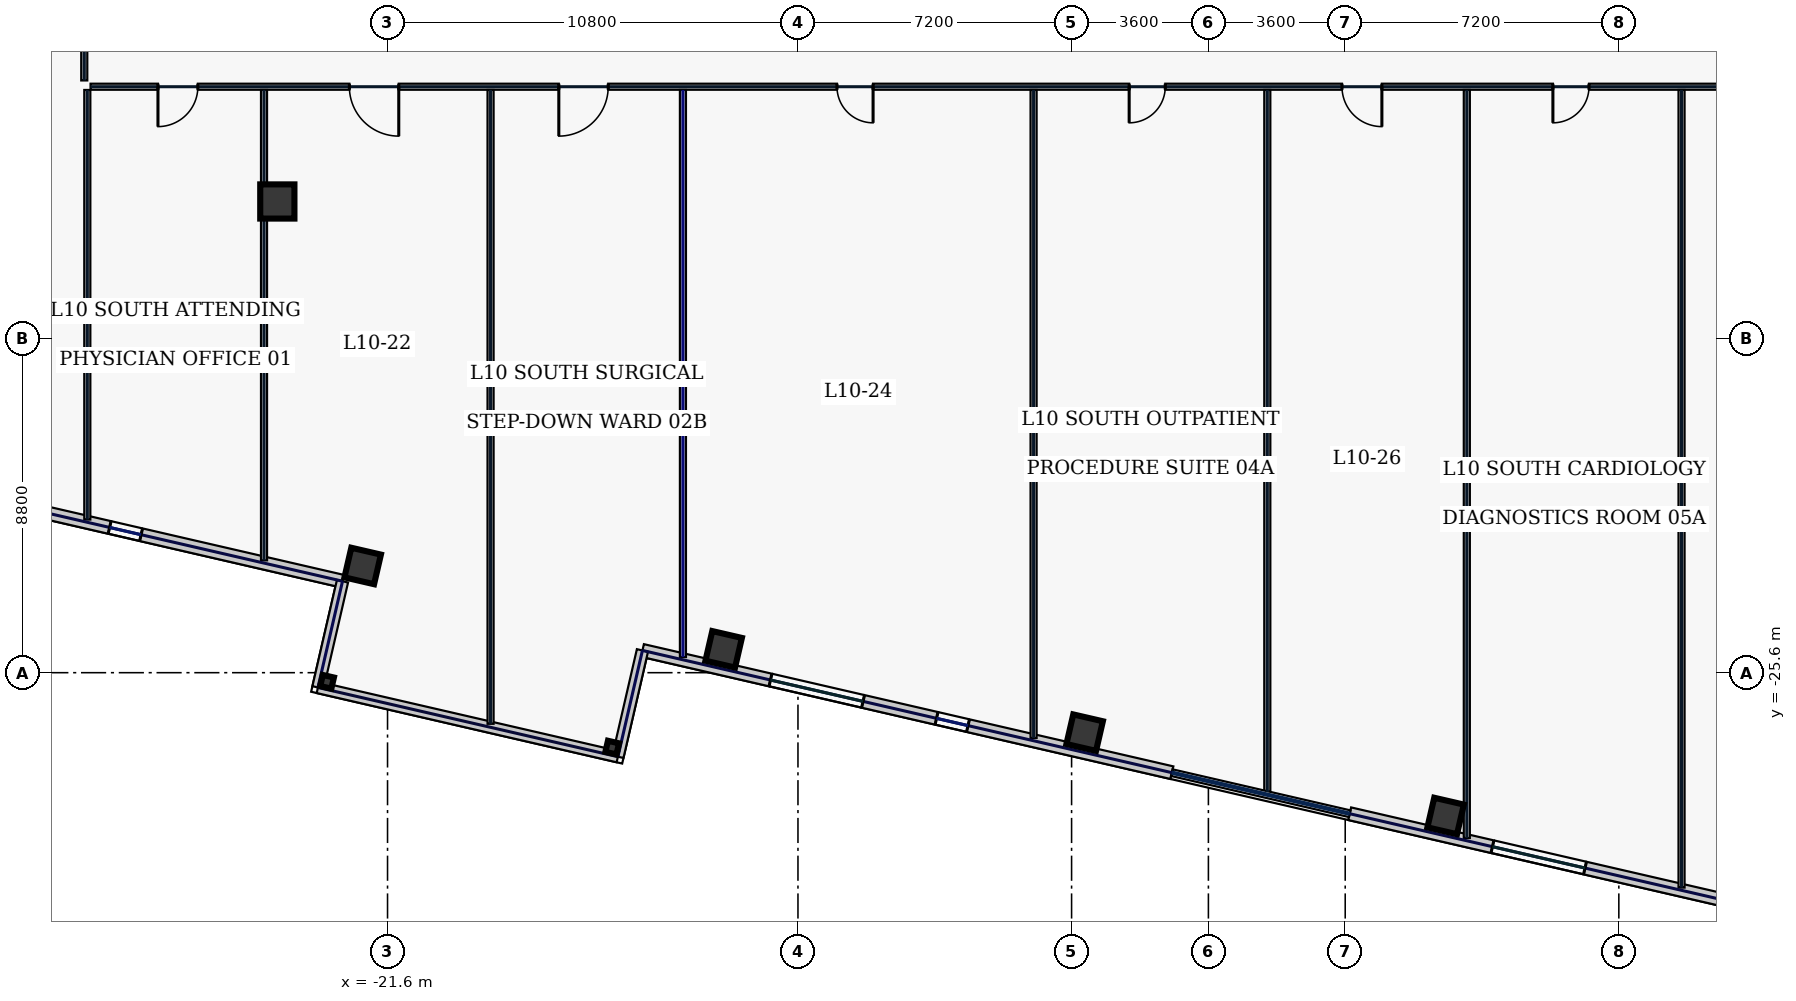
"""IFC4 building model, lengths in metres.
Left out: names, types, materials, properties, quantities, classifications, styles, units other than length and angle.
Written with IfcOpenShell. Run it as: python <this file> out.ifc"""

import sys

from ifc_helpers import new_model, si_unit, direction, frame, frame_2d, origin, origin_2d, place, context, subcontext, project, spatial, rectangle, hollow_rectangle, extrude, element, fill, save


model = new_model("IFC4")
c1 = context("Model", 3, precision=1e-05, world=origin(), true_north=direction((0.0, 1.0)))
c2 = subcontext(c1, "Body", "Model", "MODEL_VIEW")
j1 = project(units=[si_unit("LENGTHUNIT", "METRE"), si_unit("PLANEANGLEUNIT", "RADIAN")], contexts=[c1])
p1 = place(None, origin())
s1 = spatial("IfcSite", under=j1, at=p1, CompositionType="ELEMENT")
p2 = place(p1, origin())
s2 = spatial("IfcBuilding", under=s1, at=p2, CompositionType="ELEMENT")
p3 = place(p2, frame((0.0, 0.0, 51.4)))
s3 = spatial("IfcBuildingStorey", under=s2, at=p3, CompositionType="ELEMENT", Elevation=51.4)
p4 = place(p3, frame((-24.5, -13.2, 0.0), z_axis=(0.0, 0.0, 1.0), x_axis=(1.0, 0.0, 0.0)))
e1 = element("IfcColumn", 1, at=p4, inside=s3, PredefinedType="COLUMN", context=c2, shape_type="SweptSolid", body=[
    extrude(hollow_rectangle(XDim=0.9, YDim=0.9, WallThickness=0.04, at=origin_2d()), origin(), (0.0, 0.0, 1.0), 3.74),
])
for number, where, z_axis, x_axis in (
    (2, (-22.254, -22.792, 0.0), (0.0, 0.0, 1.0), (0.974, -0.225, 0.0)),
    (3, (-12.755, -24.985, 0.0), (0.0, 0.0, 1.0), (0.974, -0.225, 0.0)),
    (4, (-3.256, -27.178, 0.0), (0.0, 0.0, 1.0), (0.974, -0.225, 0.0)),
    (5, (6.242, -29.371, 0.0), (0.0, 0.0, 1.0), (0.974, -0.225, 0.0)),
):
    element("IfcColumn", number, at=place(p3, frame(where, z_axis=z_axis, x_axis=x_axis)), inside=s3, PredefinedType="COLUMN", context=c2, shape_type="SweptSolid", body=[
        extrude(hollow_rectangle(XDim=0.8, YDim=0.8, WallThickness=0.036, at=origin_2d()), origin(), (0.0, 0.0, 1.0), 3.74),
    ])
for number, where, z_axis, x_axis in (
    (6, (-23.19, -25.839, 0.0), (0.0, 0.0, 1.0), (0.974, -0.225, 0.0)),
    (7, (-15.688, -27.571, 0.0), (0.0, 0.0, 1.0), (0.974, -0.225, 0.0)),
):
    element("IfcColumn", number, at=place(p3, frame(where, z_axis=z_axis, x_axis=x_axis)), inside=s3, PredefinedType="COLUMN", context=c2, shape_type="SweptSolid", body=[
        extrude(hollow_rectangle(XDim=0.3, YDim=0.3, WallThickness=0.016, at=origin_2d()), origin(), (0.0, 0.0, 1.0), 3.74),
    ])
p5 = place(p3, frame((-42.029, -18.75, 0.0), z_axis=(0.0, 0.0, 1.0), x_axis=(0.974371399361, -0.224945273581, 0.0)))
e8 = element("IfcWall", 8, at=p5, inside=s3, PredefinedType="STANDARD", context=c2, shape_type="SweptSolid", body=[
    extrude(rectangle(XDim=19.75, YDim=0.34, at=frame_2d((9.875, 0.0))), origin(), (0.0, 0.0, 1.0), 3.74),
])
p6 = place(p5, frame((2.062, 0.0, 0.72)))
e9 = element("IfcOpeningElement", 9, at=p6, cuts=e8, PredefinedType="OPENING", context=c2, shape_type="SweptSolid", body=[
    extrude(rectangle(XDim=2.5, YDim=2.15, at=frame_2d((1.25, 1.075))), frame((0.0, 0.18, 0.0), z_axis=(0.0, -1.0, 0.0), x_axis=(1.0, 0.0, 0.0)), (0.0, 0.0, 1.0), 0.36),
])
p7 = place(p5, frame((6.546, 0.0, 0.72)))
e10 = element("IfcOpeningElement", 10, at=p7, cuts=e8, PredefinedType="OPENING", context=c2, shape_type="SweptSolid", body=[
    extrude(rectangle(XDim=2.5, YDim=2.15, at=frame_2d((1.25, 1.075))), frame((0.0, 0.18, 0.0), z_axis=(0.0, -1.0, 0.0), x_axis=(1.0, 0.0, 0.0)), (0.0, 0.0, 1.0), 0.36),
])
p8 = place(p5, frame((13.461, 0.0, 0.72)))
e11 = element("IfcOpeningElement", 11, at=p8, cuts=e8, PredefinedType="OPENING", context=c2, shape_type="SweptSolid", body=[
    extrude(rectangle(XDim=0.85, YDim=1.85, at=frame_2d((0.425, 0.925))), frame((0.0, 0.18, 0.0), z_axis=(0.0, -1.0, 0.0), x_axis=(1.0, 0.0, 0.0)), (0.0, 0.0, 1.0), 0.36),
])
p9 = place(p3, frame((-14.892, -25.015, 0.0), z_axis=(0.0, 0.0, 1.0), x_axis=(0.974372775, -0.224939314791, 0.0)))
e12 = element("IfcWall", 12, at=p9, inside=s3, PredefinedType="STANDARD", context=c2, shape_type="SweptSolid", body=[
    extrude(rectangle(XDim=14.299, YDim=0.34, at=frame_2d((7.149, 0.0))), origin(), (0.0, 0.0, 1.0), 3.74),
])
p10 = place(p9, frame((3.458, 0.0, 0.72)))
e13 = element("IfcOpeningElement", 13, at=p10, cuts=e12, PredefinedType="OPENING", context=c2, shape_type="SweptSolid", body=[
    extrude(rectangle(XDim=2.5, YDim=2.15, at=frame_2d((1.25, 1.075))), frame((0.0, 0.18, 0.0), z_axis=(0.0, -1.0, 0.0), x_axis=(1.0, 0.0, 0.0)), (0.0, 0.0, 1.0), 0.36),
])
p11 = place(p9, frame((7.942, 0.0, 0.72)))
e14 = element("IfcOpeningElement", 14, at=p11, cuts=e12, PredefinedType="OPENING", context=c2, shape_type="SweptSolid", body=[
    extrude(rectangle(XDim=0.85, YDim=1.85, at=frame_2d((0.425, 0.925))), frame((0.0, 0.18, 0.0), z_axis=(0.0, -1.0, 0.0), x_axis=(1.0, 0.0, 0.0)), (0.0, 0.0, 1.0), 0.36),
])
p12 = place(p3, frame((3.717, -29.311, 0.0), z_axis=(0.0, 0.0, 1.0), x_axis=(0.97436993772, -0.224951604723, 0.0)))
e15 = element("IfcWall", 15, at=p12, inside=s3, PredefinedType="STANDARD", context=c2, shape_type="SweptSolid", body=[
    extrude(rectangle(XDim=22.651, YDim=0.34, at=frame_2d((11.326, 0.0))), origin(), (0.0, 0.0, 1.0), 3.74),
])
p13 = place(p12, frame((3.856, 0.0, 0.72)))
e16 = element("IfcOpeningElement", 16, at=p13, cuts=e15, PredefinedType="OPENING", context=c2, shape_type="SweptSolid", body=[
    extrude(rectangle(XDim=2.5, YDim=2.15, at=frame_2d((1.25, 1.075))), frame((0.0, 0.18, 0.0), z_axis=(0.0, -1.0, 0.0), x_axis=(1.0, 0.0, 0.0)), (0.0, 0.0, 1.0), 0.36),
])
p14 = place(p12, frame((9.991, 0.0, 0.72)))
e17 = element("IfcOpeningElement", 17, at=p14, cuts=e15, PredefinedType="OPENING", context=c2, shape_type="SweptSolid", body=[
    extrude(rectangle(XDim=0.85, YDim=1.85, at=frame_2d((0.425, 0.925))), frame((0.0, 0.18, 0.0), z_axis=(0.0, -1.0, 0.0), x_axis=(1.0, 0.0, 0.0)), (0.0, 0.0, 1.0), 0.36),
])
p15 = place(p12, frame((15.255, 0.0, 0.72)))
e18 = element("IfcOpeningElement", 18, at=p15, cuts=e15, PredefinedType="OPENING", context=c2, shape_type="SweptSolid", body=[
    extrude(rectangle(XDim=0.85, YDim=1.85, at=frame_2d((0.425, 0.925))), frame((0.0, 0.18, 0.0), z_axis=(0.0, -1.0, 0.0), x_axis=(1.0, 0.0, 0.0)), (0.0, 0.0, 1.0), 0.36),
])
p16 = place(p12, frame((19.739, 0.0, 0.72)))
e19 = element("IfcOpeningElement", 19, at=p16, cuts=e15, PredefinedType="OPENING", context=c2, shape_type="SweptSolid", body=[
    extrude(rectangle(XDim=0.85, YDim=1.85, at=frame_2d((0.425, 0.925))), frame((0.0, 0.18, 0.0), z_axis=(0.0, -1.0, 0.0), x_axis=(1.0, 0.0, 0.0)), (0.0, 0.0, 1.0), 0.36),
])
p17 = place(p3, frame((-22.785, -23.193, 0.0), z_axis=(0.0, 0.0, 1.0), x_axis=(-0.224983749842, -0.974362515857, 0.0)))
e20 = element("IfcWall", 20, at=p17, inside=s3, PredefinedType="STANDARD", context=c2, shape_type="SweptSolid", body=[
    extrude(rectangle(XDim=2.87, YDim=0.3, at=frame_2d((1.435, 0.0))), origin(), (0.0, 0.0, 1.0), 3.285),
])
p18 = place(p3, frame((-14.892, -25.015, 0.0), z_axis=(0.0, 0.0, 1.0), x_axis=(-0.225002397841, -0.97435820978, 0.0)))
e21 = element("IfcWall", 21, at=p18, inside=s3, PredefinedType="STANDARD", context=c2, shape_type="SweptSolid", body=[
    extrude(rectangle(XDim=2.87, YDim=0.3, at=frame_2d((1.435, 0.0))), origin(), (0.0, 0.0, 1.0), 3.285),
])
p19 = place(p3, frame((-23.43, -25.989, 0.0), z_axis=(0.0, 0.0, 1.0), x_axis=(0.974371888243, -0.224943155936, 0.0)))
e22 = element("IfcWall", 22, at=p19, inside=s3, PredefinedType="STANDARD", context=c2, shape_type="SweptSolid", body=[
    extrude(rectangle(XDim=8.1, YDim=0.3, at=frame_2d((4.05, 0.0))), origin(), (0.0, 0.0, 1.0), 3.385),
])
p20 = place(p3, frame((-29.58, -10.015, 0.0), z_axis=(0.0, 0.0, 1.0), x_axis=(0.0, 1.0, 0.0)))
e23 = element("IfcWall", 23, at=p20, inside=s3, PredefinedType="PARTITIONING", context=c2, shape_type="SweptSolid", body=[
    extrude(rectangle(XDim=20.13, YDim=0.16, at=frame_2d((10.065, 0.0))), origin(), (0.0, 0.0, 1.0), 3.74),
])
p21 = place(p20, frame((2.169, 0.0, 0.0)))
e24 = element("IfcOpeningElement", 24, at=p21, cuts=e23, PredefinedType="OPENING", context=c2, shape_type="SweptSolid", body=[
    extrude(rectangle(XDim=0.95, YDim=2.2, at=frame_2d((0.475, 1.1))), frame((0.0, 0.09, 0.0), z_axis=(0.0, -1.0, 0.0), x_axis=(1.0, 0.0, 0.0)), (0.0, 0.0, 1.0), 0.18),
])
p22 = place(p20, frame((6.4, 0.0, 0.0)))
e25 = element("IfcOpeningElement", 25, at=p22, cuts=e23, PredefinedType="OPENING", context=c2, shape_type="SweptSolid", body=[
    extrude(rectangle(XDim=0.95, YDim=2.2, at=frame_2d((0.475, 1.1))), frame((0.0, 0.09, 0.0), z_axis=(0.0, -1.0, 0.0), x_axis=(1.0, 0.0, 0.0)), (0.0, 0.0, 1.0), 0.18),
])
p23 = place(p20, frame((11.6, 0.0, 0.0)))
e26 = element("IfcOpeningElement", 26, at=p23, cuts=e23, PredefinedType="OPENING", context=c2, shape_type="SweptSolid", body=[
    extrude(rectangle(XDim=0.95, YDim=2.2, at=frame_2d((0.475, 1.1))), frame((0.0, 0.09, 0.0), z_axis=(0.0, -1.0, 0.0), x_axis=(1.0, 0.0, 0.0)), (0.0, 0.0, 1.0), 0.18),
])
p24 = place(p20, frame((17.131, 0.0, 0.0)))
e27 = element("IfcOpeningElement", 27, at=p24, cuts=e23, PredefinedType="OPENING", context=c2, shape_type="SweptSolid", body=[
    extrude(rectangle(XDim=0.95, YDim=2.2, at=frame_2d((0.475, 1.1))), frame((0.0, 0.09, 0.0), z_axis=(0.0, -1.0, 0.0), x_axis=(1.0, 0.0, 0.0)), (0.0, 0.0, 1.0), 0.18),
])
p25 = place(p3, frame((29.415, -10.18, 0.0), z_axis=(0.0, 0.0, 1.0), x_axis=(-1.0, 0.0, 0.0)))
e28 = element("IfcWall", 28, at=p25, inside=s3, PredefinedType="PARTITIONING", context=c2, shape_type="SweptSolid", body=[
    extrude(rectangle(XDim=58.83, YDim=0.16, at=frame_2d((29.415, 0.0))), origin(), (0.0, 0.0, 1.0), 3.74),
])
p26 = place(p25, frame((56.006, 0.0, 0.0)))
e29 = element("IfcOpeningElement", 29, at=p26, cuts=e28, PredefinedType="OPENING", context=c2, shape_type="SweptSolid", body=[
    extrude(rectangle(XDim=1.05, YDim=2.2, at=frame_2d((0.525, 1.1))), frame((0.0, 0.09, 0.0), z_axis=(0.0, -1.0, 0.0), x_axis=(1.0, 0.0, 0.0)), (0.0, 0.0, 1.0), 0.18),
])
p27 = place(p25, frame((50.719, 0.0, 0.0)))
e30 = element("IfcOpeningElement", 30, at=p27, cuts=e28, PredefinedType="OPENING", context=c2, shape_type="SweptSolid", body=[
    extrude(rectangle(XDim=1.3, YDim=2.2, at=frame_2d((0.65, 1.1))), frame((0.0, 0.09, 0.0), z_axis=(0.0, -1.0, 0.0), x_axis=(1.0, 0.0, 0.0)), (0.0, 0.0, 1.0), 0.18),
])
p28 = place(p25, frame((45.208, 0.0, 0.0)))
e31 = element("IfcOpeningElement", 31, at=p28, cuts=e28, PredefinedType="OPENING", context=c2, shape_type="SweptSolid", body=[
    extrude(rectangle(XDim=1.3, YDim=2.2, at=frame_2d((0.65, 1.1))), frame((0.0, 0.09, 0.0), z_axis=(0.0, -1.0, 0.0), x_axis=(1.0, 0.0, 0.0)), (0.0, 0.0, 1.0), 0.18),
])
p29 = place(p25, frame((38.239, 0.0, 0.0)))
e32 = element("IfcOpeningElement", 32, at=p29, cuts=e28, PredefinedType="OPENING", context=c2, shape_type="SweptSolid", body=[
    extrude(rectangle(XDim=0.95, YDim=2.2, at=frame_2d((0.475, 1.1))), frame((0.0, 0.09, 0.0), z_axis=(0.0, -1.0, 0.0), x_axis=(1.0, 0.0, 0.0)), (0.0, 0.0, 1.0), 0.18),
])
p30 = place(p25, frame((30.55, 0.0, 0.0)))
e33 = element("IfcOpeningElement", 33, at=p30, cuts=e28, PredefinedType="OPENING", context=c2, shape_type="SweptSolid", body=[
    extrude(rectangle(XDim=0.95, YDim=2.2, at=frame_2d((0.475, 1.1))), frame((0.0, 0.09, 0.0), z_axis=(0.0, -1.0, 0.0), x_axis=(1.0, 0.0, 0.0)), (0.0, 0.0, 1.0), 0.18),
])
p31 = place(p25, frame((24.85, 0.0, 0.0)))
e34 = element("IfcOpeningElement", 34, at=p31, cuts=e28, PredefinedType="OPENING", context=c2, shape_type="SweptSolid", body=[
    extrude(rectangle(XDim=1.05, YDim=2.2, at=frame_2d((0.525, 1.1))), frame((0.0, 0.09, 0.0), z_axis=(0.0, -1.0, 0.0), x_axis=(1.0, 0.0, 0.0)), (0.0, 0.0, 1.0), 0.18),
])
p32 = place(p25, frame((19.4, 0.0, 0.0)))
e35 = element("IfcOpeningElement", 35, at=p32, cuts=e28, PredefinedType="OPENING", context=c2, shape_type="SweptSolid", body=[
    extrude(rectangle(XDim=0.95, YDim=2.2, at=frame_2d((0.475, 1.1))), frame((0.0, 0.09, 0.0), z_axis=(0.0, -1.0, 0.0), x_axis=(1.0, 0.0, 0.0)), (0.0, 0.0, 1.0), 0.18),
])
p33 = place(p25, frame((14.2, 0.0, 0.0)))
e36 = element("IfcOpeningElement", 36, at=p33, cuts=e28, PredefinedType="OPENING", context=c2, shape_type="SweptSolid", body=[
    extrude(rectangle(XDim=0.95, YDim=2.2, at=frame_2d((0.475, 1.1))), frame((0.0, 0.09, 0.0), z_axis=(0.0, -1.0, 0.0), x_axis=(1.0, 0.0, 0.0)), (0.0, 0.0, 1.0), 0.18),
])
p34 = place(p25, frame((9.7, 0.0, 0.0)))
e37 = element("IfcOpeningElement", 37, at=p34, cuts=e28, PredefinedType="OPENING", context=c2, shape_type="SweptSolid", body=[
    extrude(rectangle(XDim=0.95, YDim=2.2, at=frame_2d((0.475, 1.1))), frame((0.0, 0.09, 0.0), z_axis=(0.0, -1.0, 0.0), x_axis=(1.0, 0.0, 0.0)), (0.0, 0.0, 1.0), 0.18),
])
p35 = place(p25, frame((5.725, 0.0, 0.0)))
e38 = element("IfcOpeningElement", 38, at=p35, cuts=e28, PredefinedType="OPENING", context=c2, shape_type="SweptSolid", body=[
    extrude(rectangle(XDim=1.3, YDim=2.2, at=frame_2d((0.65, 1.1))), frame((0.0, 0.09, 0.0), z_axis=(0.0, -1.0, 0.0), x_axis=(1.0, 0.0, 0.0)), (0.0, 0.0, 1.0), 0.18),
])
p36 = place(p25, frame((1.894, 0.0, 0.0)))
e39 = element("IfcOpeningElement", 39, at=p36, cuts=e28, PredefinedType="OPENING", context=c2, shape_type="SweptSolid", body=[
    extrude(rectangle(XDim=1.3, YDim=2.2, at=frame_2d((0.65, 1.1))), frame((0.0, 0.09, 0.0), z_axis=(0.0, -1.0, 0.0), x_axis=(1.0, 0.0, 0.0)), (0.0, 0.0, 1.0), 0.18),
])
p37 = place(p3, frame((-29.5, -21.571, 0.0), z_axis=(0.0, 0.0, 1.0), x_axis=(0.0, 1.0, 0.0)))
e40 = element("IfcWall", 40, at=p37, inside=s3, PredefinedType="PARTITIONING", context=c2, shape_type="SweptSolid", body=[
    extrude(rectangle(XDim=11.306, YDim=0.16, at=frame_2d((5.653, 0.0))), origin(), (0.0, 0.0, 1.0), 3.74),
])
p38 = place(p3, frame((-24.85, -22.644, 0.0), z_axis=(0.0, 0.0, 1.0), x_axis=(0.0, 1.0, 0.0)))
e41 = element("IfcWall", 41, at=p38, inside=s3, PredefinedType="PARTITIONING", context=c2, shape_type="SweptSolid", body=[
    extrude(rectangle(XDim=12.379, YDim=0.16, at=frame_2d((6.189, 0.0))), origin(), (0.0, 0.0, 1.0), 3.74),
])
p39 = place(p3, frame((-13.827, -25.189, 0.0), z_axis=(0.0, 0.0, 1.0), x_axis=(0.0, 1.0, 0.0)))
e42 = element("IfcWall", 42, at=p39, inside=s3, PredefinedType="PARTITIONING", context=c2, shape_type="SweptSolid", body=[
    extrude(rectangle(XDim=14.924, YDim=0.16, at=frame_2d((7.462, 0.0))), origin(), (0.0, 0.0, 1.0), 3.285),
])
p40 = place(p3, frame((-4.6, -27.319, 0.0), z_axis=(0.0, 0.0, 1.0), x_axis=(0.0, 1.0, 0.0)))
e43 = element("IfcWall", 43, at=p40, inside=s3, PredefinedType="PARTITIONING", context=c2, shape_type="SweptSolid", body=[
    extrude(rectangle(XDim=17.054, YDim=0.16, at=frame_2d((8.527, 0.0))), origin(), (0.0, 0.0, 1.0), 3.74),
])
p41 = place(p3, frame((6.8, -29.951, 0.0), z_axis=(0.0, 0.0, 1.0), x_axis=(0.0, 1.0, 0.0)))
e44 = element("IfcWall", 44, at=p41, inside=s3, PredefinedType="PARTITIONING", context=c2, shape_type="SweptSolid", body=[
    extrude(rectangle(XDim=19.686, YDim=0.16, at=frame_2d((9.843, 0.0))), origin(), (0.0, 0.0, 1.0), 3.74),
])
p42 = place(p3, frame((-18.889, -26.945, 0.0), z_axis=(0.0, 0.0, 1.0), x_axis=(0.0, 1.0, 0.0)))
e45 = element("IfcWall", 45, at=p42, inside=s3, PredefinedType="PARTITIONING", context=c2, shape_type="SweptSolid", body=[
    extrude(rectangle(XDim=16.68, YDim=0.16, at=frame_2d((8.34, 0.0))), origin(), (0.0, 0.0, 1.0), 3.74),
])
p43 = place(p3, frame((1.55, -28.739, 0.0), z_axis=(0.0, 0.0, 1.0), x_axis=(0.0, 1.0, 0.0)))
e46 = element("IfcWall", 46, at=p43, inside=s3, PredefinedType="PARTITIONING", context=c2, shape_type="SweptSolid", body=[
    extrude(rectangle(XDim=18.474, YDim=0.16, at=frame_2d((9.237, 0.0))), origin(), (0.0, 0.0, 1.0), 3.74),
])
p44 = place(p3, frame((12.45, -31.256, 0.0), z_axis=(0.0, 0.0, 1.0), x_axis=(0.0, 1.0, 0.0)))
e47 = element("IfcWall", 47, at=p44, inside=s3, PredefinedType="PARTITIONING", context=c2, shape_type="SweptSolid", body=[
    extrude(rectangle(XDim=20.991, YDim=0.16, at=frame_2d((10.495, 0.0))), origin(), (0.0, 0.0, 1.0), 3.74),
])
p45 = place(p8, origin())
e48 = element("IfcWindow", 48, at=p45, inside=s3, PartitioningType="SINGLE_PANEL", PredefinedType="WINDOW", context=c2, shape_type="SweptSolid", body=[
    extrude(rectangle(XDim=0.85, YDim=1.85, at=frame_2d((0.425, 0.925))), frame((0.0, 0.03, 0.0), z_axis=(0.0, -1.0, 0.0), x_axis=(1.0, 0.0, 0.0)), (0.0, 0.0, 1.0), 0.06),
])
fill(e11, e48)
p46 = place(p10, origin())
e49 = element("IfcWindow", 49, at=p46, inside=s3, PartitioningType="SINGLE_PANEL", PredefinedType="WINDOW", context=c2, shape_type="SweptSolid", body=[
    extrude(rectangle(XDim=2.5, YDim=2.15, at=frame_2d((1.25, 1.075))), frame((0.0, 0.03, 0.0), z_axis=(0.0, -1.0, 0.0), x_axis=(1.0, 0.0, 0.0)), (0.0, 0.0, 1.0), 0.06),
])
fill(e13, e49)
p47 = place(p11, origin())
e50 = element("IfcWindow", 50, at=p47, inside=s3, PartitioningType="SINGLE_PANEL", PredefinedType="WINDOW", context=c2, shape_type="SweptSolid", body=[
    extrude(rectangle(XDim=0.85, YDim=1.85, at=frame_2d((0.425, 0.925))), frame((0.0, 0.03, 0.0), z_axis=(0.0, -1.0, 0.0), x_axis=(1.0, 0.0, 0.0)), (0.0, 0.0, 1.0), 0.06),
])
fill(e14, e50)
p48 = place(p13, origin())
e51 = element("IfcWindow", 51, at=p48, inside=s3, PartitioningType="SINGLE_PANEL", PredefinedType="WINDOW", context=c2, shape_type="SweptSolid", body=[
    extrude(rectangle(XDim=2.5, YDim=2.15, at=frame_2d((1.25, 1.075))), frame((0.0, 0.03, 0.0), z_axis=(0.0, -1.0, 0.0), x_axis=(1.0, 0.0, 0.0)), (0.0, 0.0, 1.0), 0.06),
])
fill(e16, e51)
p49 = place(p26, origin())
e52 = element("IfcDoor", 52, at=p49, inside=s3, OperationType="SINGLE_SWING_RIGHT", PredefinedType="DOOR", context=c2, shape_type="SweptSolid", body=[
    extrude(rectangle(XDim=1.05, YDim=2.2, at=frame_2d((0.525, 1.1))), frame((0.0, 0.025, 0.0), z_axis=(0.0, -1.0, 0.0), x_axis=(1.0, 0.0, 0.0)), (0.0, 0.0, 1.0), 0.05),
])
fill(e29, e52)
p50 = place(p27, origin())
e53 = element("IfcDoor", 53, at=p50, inside=s3, OperationType="SINGLE_SWING_LEFT", PredefinedType="DOOR", context=c2, shape_type="SweptSolid", body=[
    extrude(rectangle(XDim=1.3, YDim=2.2, at=frame_2d((0.65, 1.1))), frame((0.0, 0.025, 0.0), z_axis=(0.0, -1.0, 0.0), x_axis=(1.0, 0.0, 0.0)), (0.0, 0.0, 1.0), 0.05),
])
fill(e30, e53)
p51 = place(p28, origin())
e54 = element("IfcDoor", 54, at=p51, inside=s3, OperationType="SINGLE_SWING_RIGHT", PredefinedType="DOOR", context=c2, shape_type="SweptSolid", body=[
    extrude(rectangle(XDim=1.3, YDim=2.2, at=frame_2d((0.65, 1.1))), frame((0.0, 0.025, 0.0), z_axis=(0.0, -1.0, 0.0), x_axis=(1.0, 0.0, 0.0)), (0.0, 0.0, 1.0), 0.05),
])
fill(e31, e54)
p52 = place(p29, origin())
e55 = element("IfcDoor", 55, at=p52, inside=s3, OperationType="SINGLE_SWING_LEFT", PredefinedType="DOOR", context=c2, shape_type="SweptSolid", body=[
    extrude(rectangle(XDim=0.95, YDim=2.2, at=frame_2d((0.475, 1.1))), frame((0.0, 0.025, 0.0), z_axis=(0.0, -1.0, 0.0), x_axis=(1.0, 0.0, 0.0)), (0.0, 0.0, 1.0), 0.05),
])
fill(e32, e55)
p53 = place(p30, origin())
e56 = element("IfcDoor", 56, at=p53, inside=s3, OperationType="SINGLE_SWING_RIGHT", PredefinedType="DOOR", context=c2, shape_type="SweptSolid", body=[
    extrude(rectangle(XDim=0.95, YDim=2.2, at=frame_2d((0.475, 1.1))), frame((0.0, 0.025, 0.0), z_axis=(0.0, -1.0, 0.0), x_axis=(1.0, 0.0, 0.0)), (0.0, 0.0, 1.0), 0.05),
])
fill(e33, e56)
p54 = place(p31, origin())
e57 = element("IfcDoor", 57, at=p54, inside=s3, OperationType="SINGLE_SWING_LEFT", PredefinedType="DOOR", context=c2, shape_type="SweptSolid", body=[
    extrude(rectangle(XDim=1.05, YDim=2.2, at=frame_2d((0.525, 1.1))), frame((0.0, 0.025, 0.0), z_axis=(0.0, -1.0, 0.0), x_axis=(1.0, 0.0, 0.0)), (0.0, 0.0, 1.0), 0.05),
])
fill(e34, e57)
p55 = place(p32, origin())
e58 = element("IfcDoor", 58, at=p55, inside=s3, OperationType="SINGLE_SWING_RIGHT", PredefinedType="DOOR", context=c2, shape_type="SweptSolid", body=[
    extrude(rectangle(XDim=0.95, YDim=2.2, at=frame_2d((0.475, 1.1))), frame((0.0, 0.025, 0.0), z_axis=(0.0, -1.0, 0.0), x_axis=(1.0, 0.0, 0.0)), (0.0, 0.0, 1.0), 0.05),
])
fill(e35, e58)
save(model, sys.argv[1])
